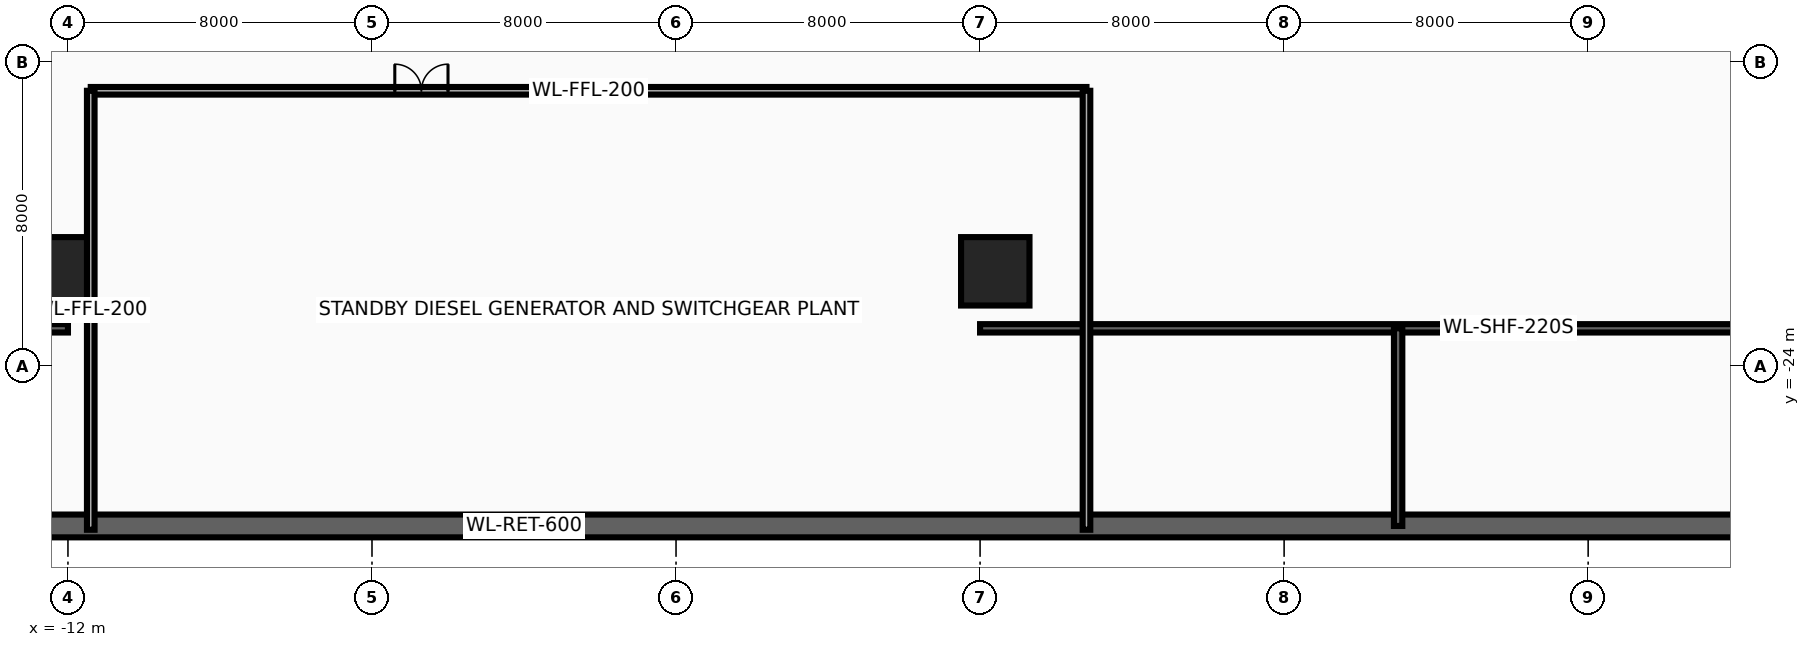
"""IFC4 building model, lengths in metres.
Left out: names, types, materials, properties, quantities, classifications, styles, units other than length and angle.
Written with IfcOpenShell. Run it as: python <this file> out.ifc"""

import sys

from ifc_helpers import new_model, si_unit, direction, frame, frame_2d, origin, origin_2d, place, context, subcontext, project, spatial, rectangle, extrude, source, transform, mapped, element, fill, save


model = new_model("IFC4")
c1 = context("Model", 3, precision=1e-05, world=origin(), true_north=direction((0.0, 1.0)))
c2 = subcontext(c1, "Body", "Model", "MODEL_VIEW")
j1 = project(units=[si_unit("LENGTHUNIT", "METRE"), si_unit("PLANEANGLEUNIT", "RADIAN")], contexts=[c1])
p1 = place(None, origin())
s1 = spatial("IfcSite", under=j1, at=p1, CompositionType="ELEMENT")
p2 = place(p1, origin())
s2 = spatial("IfcBuilding", under=s1, at=p2, CompositionType="ELEMENT")
p3 = place(p2, frame((0.0, 0.0, -4.8)))
s3 = spatial("IfcBuildingStorey", under=s2, at=p3, CompositionType="ELEMENT", Elevation=-4.8)
p4 = place(p3, frame((-40.5, -28.2, 0.0), z_axis=(0.0, 0.0, 1.0), x_axis=(1.0, 0.0, 0.0)))
e1 = element("IfcWall", 1, at=p4, inside=s3, PredefinedType="SOLIDWALL", context=c2, shape_type="SweptSolid", body=[
    extrude(rectangle(XDim=81.0, YDim=0.6, at=frame_2d((40.5, 0.0))), origin(), (0.0, 0.0, 1.0), 4.52),
])
for number, where, z_axis, x_axis in (
    (2, (-39.8, -23.0, 0.0), (0.0, 0.0, 1.0), (1.0, 0.0, 0.0)),
    (3, (12.0, -23.0, 0.0), (0.0, 0.0, 1.0), (1.0, 0.0, 0.0)),
):
    element("IfcWall", number, at=place(p3, frame(where, z_axis=z_axis, x_axis=x_axis)), inside=s3, PredefinedType="SHEAR", context=c2, shape_type="SweptSolid", body=[
        extrude(rectangle(XDim=27.8, YDim=0.22, at=frame_2d((13.9, 0.0))), origin(), (0.0, 0.0, 1.0), 4.52),
    ])
p5 = place(p3, frame((23.0, -28.2, 0.0), z_axis=(0.0, 0.0, 1.0), x_axis=(0.0, 1.0, 0.0)))
e4 = element("IfcWall", 4, at=p5, inside=s3, PredefinedType="SHEAR", context=c2, shape_type="SweptSolid", body=[
    extrude(rectangle(XDim=5.2, YDim=0.22, at=frame_2d((2.6, 0.0))), origin(), (0.0, 0.0, 1.0), 4.52),
])
m1 = source(origin(), c2, "Body", "SweptSolid", [
    extrude(rectangle(XDim=1.8, YDim=1.8, at=origin_2d()), origin(), (0.0, 0.0, 1.0), 4.8),
])
for number, where, z_axis, x_axis in (
    (5, (-12.4, -21.5, 0.0), (0.0, 0.0, 1.0), (1.0, 0.0, 0.0)),
    (6, (12.4, -21.5, 0.0), (0.0, 0.0, 1.0), (1.0, 0.0, 0.0)),
):
    element("IfcColumn", number, at=place(p3, frame(where, z_axis=z_axis, x_axis=x_axis)), inside=s3, PredefinedType="COLUMN", context=c2, shape_type="MappedRepresentation", body=[
        mapped(m1, transform((0.0, 0.0, 0.0), x_axis=(1.0, 0.0, 0.0), y_axis=(0.0, 1.0, 0.0), z_axis=(0.0, 0.0, 1.0), scale=1.0)),
    ])
p6 = place(p3, frame((-11.4, -16.75, 0.0), z_axis=(0.0, 0.0, 1.0), x_axis=(1.0, 0.0, 0.0)))
e7 = element("IfcWall", 7, at=p6, inside=s3, PredefinedType="PARTITIONING", context=c2, shape_type="SweptSolid", body=[
    extrude(rectangle(XDim=26.2, YDim=0.2, at=frame_2d((13.1, 0.0))), origin(), (0.0, 0.0, 1.0), 3.557),
])
p7 = place(p6, frame((8.0, 0.0, 0.0)))
e8 = element("IfcOpeningElement", 8, at=p7, cuts=e7, PredefinedType="OPENING", context=c2, shape_type="SweptSolid", body=[
    extrude(rectangle(XDim=1.4, YDim=2.15, at=frame_2d((0.7, 1.075))), frame((0.0, 0.115, 0.0), z_axis=(0.0, -1.0, 0.0), x_axis=(1.0, 0.0, 0.0)), (0.0, 0.0, 1.0), 0.23),
])
for number, where, z_axis, x_axis in (
    (9, (-11.4, -28.3, 0.0), (0.0, 0.0, 1.0), (0.0, 1.0, 0.0)),
    (10, (14.8, -28.3, 0.0), (0.0, 0.0, 1.0), (0.0, 1.0, 0.0)),
):
    element("IfcWall", number, at=place(p3, frame(where, z_axis=z_axis, x_axis=x_axis)), inside=s3, PredefinedType="PARTITIONING", context=c2, shape_type="SweptSolid", body=[
        extrude(rectangle(XDim=11.55, YDim=0.2, at=frame_2d((5.775, 0.0))), origin(), (0.0, 0.0, 1.0), 4.52),
    ])
p8 = place(p7, origin())
e11 = element("IfcDoor", 11, at=p8, inside=s3, OperationType="DOUBLE_DOOR_SINGLE_SWING", PredefinedType="DOOR", context=c2, shape_type="SweptSolid", body=[
    extrude(rectangle(XDim=1.4, YDim=2.15, at=frame_2d((0.7, 1.075))), frame((0.0, 0.025, 0.0), z_axis=(0.0, -1.0, 0.0), x_axis=(1.0, 0.0, 0.0)), (0.0, 0.0, 1.0), 0.05),
])
fill(e8, e11)
save(model, sys.argv[1])
